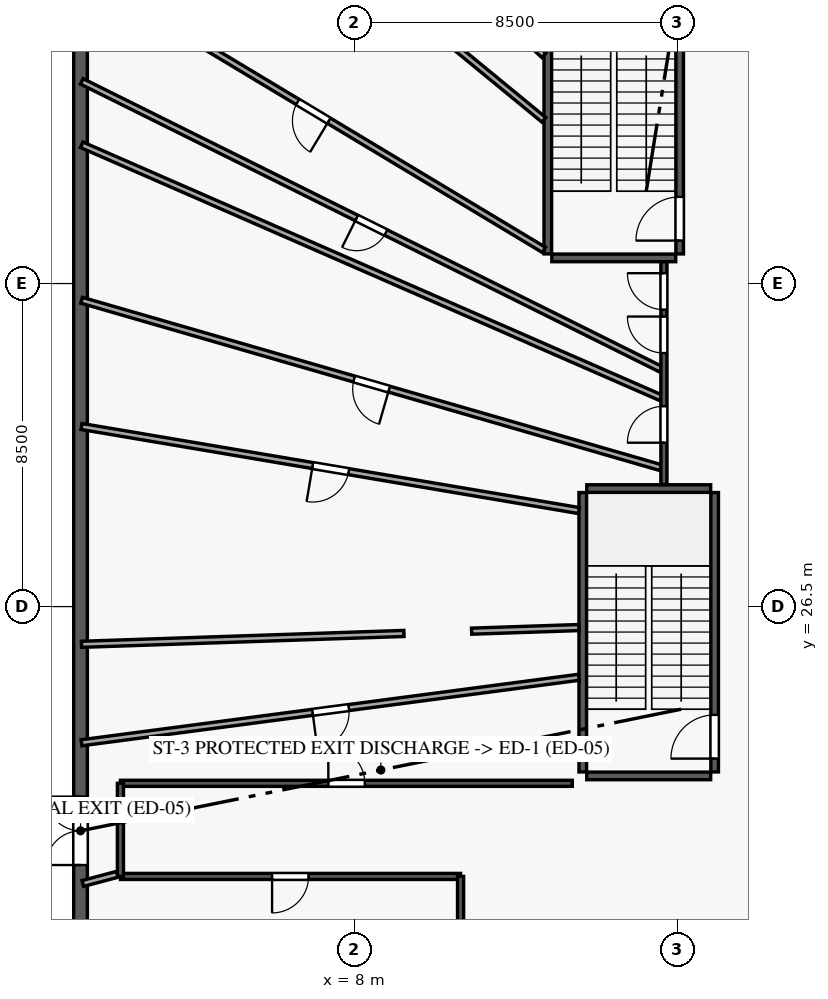
"""IFC4 building model, lengths in metres.
Left out: names, types, materials, properties, quantities, classifications, styles, units other than length and angle.
Written with IfcOpenShell. Run it as: python <this file> out.ifc"""

import sys

from ifc_helpers import new_model, si_unit, direction, frame, frame_2d, origin, origin_with_axes, origin_2d, place, context, subcontext, project, spatial, rectangle, circle, extrude, source, transform, mapped, element, fill, save


model = new_model("IFC4")
c1 = context("Model", 3, precision=1e-05, world=origin(), true_north=direction((0.0, 1.0)))
c2 = subcontext(c1, "Body", "Model", "MODEL_VIEW")
j1 = project(units=[si_unit("LENGTHUNIT", "METRE"), si_unit("PLANEANGLEUNIT", "RADIAN")], contexts=[c1])
p1 = place(None, origin())
s1 = spatial("IfcSite", under=j1, at=p1, CompositionType="ELEMENT")
p2 = place(p1, origin())
s2 = spatial("IfcBuilding", under=s1, at=p2, CompositionType="ELEMENT")
p3 = place(p2, origin())
s3 = spatial("IfcBuildingStorey", under=s2, at=p3, CompositionType="ELEMENT", Elevation=0.0)
m1 = source(origin_with_axes(), c2, "Body", "SweptSolid", [
    extrude(circle(Radius=0.9, at=origin_2d()), origin(), (0.0, 0.0, 1.0), 4.5),
])
p4 = place(p3, frame((10.2, 26.5, 0.0), z_axis=(0.0, 0.0, 1.0), x_axis=(1.0, 0.0, 0.0)))
e1 = element("IfcColumn", 1, at=p4, inside=s3, PredefinedType="COLUMN", context=c2, shape_type="MappedRepresentation", body=[
    mapped(m1, transform((0.0, 0.0, 0.0), scale=1.0)),
])
p5 = place(p3, frame((0.8, 2.5, 0.0), z_axis=(0.0, 0.0, 1.0), x_axis=(0.0, 1.0, 0.0)))
e2 = element("IfcWall", 2, at=p5, inside=s3, PredefinedType="SOLIDWALL", context=c2, shape_type="SweptSolid", body=[
    extrude(rectangle(XDim=48.0, YDim=0.36, at=frame_2d((24.0, 0.0))), origin(), (0.0, 0.0, 1.0), 4.2),
])
p6 = place(p5, frame((42.816, 0.0, 0.85)))
e3 = element("IfcOpeningElement", 3, at=p6, cuts=e2, PredefinedType="OPENING", context=c2, shape_type="SweptSolid", body=[
    extrude(rectangle(XDim=1.8, YDim=2.2, at=frame_2d((0.9, 1.1))), frame((0.0, 0.19, 0.0), z_axis=(0.0, -1.0, 0.0), x_axis=(1.0, 0.0, 0.0)), (0.0, 0.0, 1.0), 0.38),
])
p7 = place(p5, frame((38.338, 0.0, 0.85)))
e4 = element("IfcOpeningElement", 4, at=p7, cuts=e2, PredefinedType="OPENING", context=c2, shape_type="SweptSolid", body=[
    extrude(rectangle(XDim=1.8, YDim=2.2, at=frame_2d((0.9, 1.1))), frame((0.0, 0.19, 0.0), z_axis=(0.0, -1.0, 0.0), x_axis=(1.0, 0.0, 0.0)), (0.0, 0.0, 1.0), 0.38),
])
p8 = place(p5, frame((33.194, 0.0, 0.85)))
e5 = element("IfcOpeningElement", 5, at=p8, cuts=e2, PredefinedType="OPENING", context=c2, shape_type="SweptSolid", body=[
    extrude(rectangle(XDim=1.8, YDim=2.2, at=frame_2d((0.9, 1.1))), frame((0.0, 0.19, 0.0), z_axis=(0.0, -1.0, 0.0), x_axis=(1.0, 0.0, 0.0)), (0.0, 0.0, 1.0), 0.38),
])
p9 = place(p5, frame((29.492, 0.0, 0.85)))
e6 = element("IfcOpeningElement", 6, at=p9, cuts=e2, PredefinedType="OPENING", context=c2, shape_type="SweptSolid", body=[
    extrude(rectangle(XDim=1.8, YDim=2.2, at=frame_2d((0.9, 1.1))), frame((0.0, 0.19, 0.0), z_axis=(0.0, -1.0, 0.0), x_axis=(1.0, 0.0, 0.0)), (0.0, 0.0, 1.0), 0.38),
])
p10 = place(p5, frame((24.971, 0.0, 0.85)))
e7 = element("IfcOpeningElement", 7, at=p10, cuts=e2, PredefinedType="OPENING", context=c2, shape_type="SweptSolid", body=[
    extrude(rectangle(XDim=1.8, YDim=2.2, at=frame_2d((0.9, 1.1))), frame((0.0, 0.19, 0.0), z_axis=(0.0, -1.0, 0.0), x_axis=(1.0, 0.0, 0.0)), (0.0, 0.0, 1.0), 0.38),
])
p11 = place(p5, frame((12.315, 0.0, 0.85)))
e8 = element("IfcOpeningElement", 8, at=p11, cuts=e2, PredefinedType="OPENING", context=c2, shape_type="SweptSolid", body=[
    extrude(rectangle(XDim=1.8, YDim=2.2, at=frame_2d((0.9, 1.1))), frame((0.0, 0.19, 0.0), z_axis=(0.0, -1.0, 0.0), x_axis=(1.0, 0.0, 0.0)), (0.0, 0.0, 1.0), 0.38),
])
p12 = place(p5, frame((6.841, 0.0, 0.85)))
e9 = element("IfcOpeningElement", 9, at=p12, cuts=e2, PredefinedType="OPENING", context=c2, shape_type="SweptSolid", body=[
    extrude(rectangle(XDim=1.8, YDim=2.2, at=frame_2d((0.9, 1.1))), frame((0.0, 0.19, 0.0), z_axis=(0.0, -1.0, 0.0), x_axis=(1.0, 0.0, 0.0)), (0.0, 0.0, 1.0), 0.38),
])
p13 = place(p5, frame((3.189, 0.0, 0.85)))
e10 = element("IfcOpeningElement", 10, at=p13, cuts=e2, PredefinedType="OPENING", context=c2, shape_type="SweptSolid", body=[
    extrude(rectangle(XDim=1.8, YDim=2.2, at=frame_2d((0.9, 1.1))), frame((0.0, 0.19, 0.0), z_axis=(0.0, -1.0, 0.0), x_axis=(1.0, 0.0, 0.0)), (0.0, 0.0, 1.0), 0.38),
])
p14 = place(p5, frame((17.2, 0.0, 0.0)))
e11 = element("IfcOpeningElement", 11, at=p14, cuts=e2, PredefinedType="OPENING", context=c2, shape_type="SweptSolid", body=[
    extrude(rectangle(XDim=1.8, YDim=2.3, at=frame_2d((0.9, 1.15))), frame((0.0, 0.19, 0.0), z_axis=(0.0, -1.0, 0.0), x_axis=(1.0, 0.0, 0.0)), (0.0, 0.0, 1.0), 0.38),
])
p15 = place(p3, frame((14.015, 22.15, 0.0), z_axis=(0.0, 0.0, 1.0), x_axis=(0.0, 1.0, 0.0)))
e12 = element("IfcWall", 12, at=p15, inside=s3, PredefinedType="SHEAR", context=c2, shape_type="SweptSolid", body=[
    extrude(rectangle(XDim=7.35, YDim=0.2, at=frame_2d((3.675, 0.0))), origin(), (0.0, 0.0, 1.0), 4.2),
])
p16 = place(p3, frame((17.485, 22.15, 0.0), z_axis=(0.0, 0.0, 1.0), x_axis=(0.0, 1.0, 0.0)))
e13 = element("IfcWall", 13, at=p16, inside=s3, PredefinedType="SHEAR", context=c2, shape_type="SweptSolid", body=[
    extrude(rectangle(XDim=7.35, YDim=0.2, at=frame_2d((3.675, 0.0))), origin(), (0.0, 0.0, 1.0), 4.2),
])
p17 = place(p16, frame((0.35, 0.0, 0.0)))
e14 = element("IfcOpeningElement", 14, at=p17, cuts=e13, PredefinedType="OPENING", context=c2, shape_type="SweptSolid", body=[
    extrude(rectangle(XDim=1.15, YDim=2.15, at=frame_2d((0.575, 1.075))), frame((0.0, 0.11, 0.0), z_axis=(0.0, -1.0, 0.0), x_axis=(1.0, 0.0, 0.0)), (0.0, 0.0, 1.0), 0.22),
])
p18 = place(p3, frame((13.095, 35.78, 0.0), z_axis=(0.0, 0.0, 1.0), x_axis=(0.0, 1.0, 0.0)))
e15 = element("IfcWall", 15, at=p18, inside=s3, PredefinedType="SHEAR", context=c2, shape_type="SweptSolid", body=[
    extrude(rectangle(XDim=7.35, YDim=0.2, at=frame_2d((3.675, 0.0))), origin(), (0.0, 0.0, 1.0), 4.2),
])
p19 = place(p3, frame((16.565, 35.78, 0.0), z_axis=(0.0, 0.0, 1.0), x_axis=(0.0, 1.0, 0.0)))
e16 = element("IfcWall", 16, at=p19, inside=s3, PredefinedType="SHEAR", context=c2, shape_type="SweptSolid", body=[
    extrude(rectangle(XDim=7.35, YDim=0.2, at=frame_2d((3.675, 0.0))), origin(), (0.0, 0.0, 1.0), 4.2),
])
p20 = place(p19, frame((0.35, 0.0, 0.0)))
e17 = element("IfcOpeningElement", 17, at=p20, cuts=e16, PredefinedType="OPENING", context=c2, shape_type="SweptSolid", body=[
    extrude(rectangle(XDim=1.15, YDim=2.15, at=frame_2d((0.575, 1.075))), frame((0.0, 0.11, 0.0), z_axis=(0.0, -1.0, 0.0), x_axis=(1.0, 0.0, 0.0)), (0.0, 0.0, 1.0), 0.22),
])
p21 = place(p3, frame((13.2, 35.675, 0.0), z_axis=(0.0, 0.0, 1.0), x_axis=(1.0, 0.0, 0.0)))
e18 = element("IfcWall", 18, at=p21, inside=s3, PredefinedType="SHEAR", context=c2, shape_type="SweptSolid", body=[
    extrude(rectangle(XDim=3.26, YDim=0.2, at=frame_2d((1.63, 0.0))), origin(), (0.0, 0.0, 1.0), 4.2),
])
for number, where, z_axis, x_axis in (
    (19, (14.12, 22.045, 0.0), (0.0, 0.0, 1.0), (1.0, 0.0, 0.0)),
    (20, (14.12, 29.605, 0.0), (0.0, 0.0, 1.0), (1.0, 0.0, 0.0)),
):
    element("IfcWall", number, at=place(p3, frame(where, z_axis=z_axis, x_axis=x_axis)), inside=s3, PredefinedType="SHEAR", context=c2, shape_type="SweptSolid", body=[
        extrude(rectangle(XDim=3.26, YDim=0.2, at=frame_2d((1.63, 0.0))), origin(), (0.0, 0.0, 1.0), 4.2),
    ])
p22 = place(p3, frame((16.068, 32.747, 0.0), z_axis=(0.0, 0.0, 1.0), x_axis=(-0.895480769827, 0.44510020318, 0.0)))
e21 = element("IfcWall", 21, at=p22, inside=s3, PredefinedType="PARTITIONING", context=c2, shape_type="SweptSolid", body=[
    extrude(rectangle(XDim=17.015, YDim=0.16, at=frame_2d((8.507, 0.0))), origin(), (0.0, 0.0, 1.0), 4.2),
])
p23 = place(p22, frame((8.077, 0.0, 0.0)))
e22 = element("IfcOpeningElement", 22, at=p23, cuts=e21, PredefinedType="OPENING", context=c2, shape_type="SweptSolid", body=[
    extrude(rectangle(XDim=0.86, YDim=2.04, at=frame_2d((0.43, 1.02))), frame((0.0, 0.09, 0.0), z_axis=(0.0, -1.0, 0.0), x_axis=(1.0, 0.0, 0.0)), (0.0, 0.0, 1.0), 0.18),
])
p24 = place(p3, frame((16.068, 31.996, 0.0), z_axis=(0.0, 0.0, 1.0), x_axis=(-0.916400464202, 0.400262650281, 0.0)))
e23 = element("IfcWall", 23, at=p24, inside=s3, PredefinedType="PARTITIONING", context=c2, shape_type="SweptSolid", body=[
    extrude(rectangle(XDim=16.628, YDim=0.16, at=frame_2d((8.314, 0.0))), origin(), (0.0, 0.0, 1.0), 4.2),
])
p25 = place(p3, frame((16.068, 30.156, 0.0), z_axis=(0.0, 0.0, 1.0), x_axis=(-0.960680893107, 0.277654860608, 0.0)))
e24 = element("IfcWall", 24, at=p25, inside=s3, PredefinedType="PARTITIONING", context=c2, shape_type="SweptSolid", body=[
    extrude(rectangle(XDim=15.864, YDim=0.16, at=frame_2d((7.932, 0.0))), origin(), (0.0, 0.0, 1.0), 4.2),
])
p26 = place(p25, frame((7.44, 0.0, 0.0)))
e25 = element("IfcOpeningElement", 25, at=p26, cuts=e24, PredefinedType="OPENING", context=c2, shape_type="SweptSolid", body=[
    extrude(rectangle(XDim=0.96, YDim=2.15, at=frame_2d((0.48, 1.075))), frame((0.0, 0.09, 0.0), z_axis=(0.0, -1.0, 0.0), x_axis=(1.0, 0.0, 0.0)), (0.0, 0.0, 1.0), 0.18),
])
p27 = place(p3, frame((12.993, 39.307, 0.0), z_axis=(0.0, 0.0, 1.0), x_axis=(-0.772944890545, 0.634473164272, 0.0)))
e26 = element("IfcWall", 26, at=p27, inside=s3, PredefinedType="PARTITIONING", context=c2, shape_type="SweptSolid", body=[
    extrude(rectangle(XDim=15.723, YDim=0.16, at=frame_2d((7.862, 0.0))), origin(), (0.0, 0.0, 1.0), 4.2),
])
p28 = place(p3, frame((12.993, 41.004, 0.0), z_axis=(0.0, 0.0, 1.0), x_axis=(-0.732268799171, 0.681015716236, 0.0)))
e27 = element("IfcWall", 27, at=p28, inside=s3, PredefinedType="PARTITIONING", context=c2, shape_type="SweptSolid", body=[
    extrude(rectangle(XDim=14.905, YDim=0.16, at=frame_2d((7.452, 0.0))), origin(), (0.0, 0.0, 1.0), 4.2),
])
p29 = place(p28, frame((6.96, 0.0, 0.0)))
e28 = element("IfcOpeningElement", 28, at=p29, cuts=e27, PredefinedType="OPENING", context=c2, shape_type="SweptSolid", body=[
    extrude(rectangle(XDim=0.96, YDim=2.15, at=frame_2d((0.48, 1.075))), frame((0.0, 0.09, 0.0), z_axis=(0.0, -1.0, 0.0), x_axis=(1.0, 0.0, 0.0)), (0.0, 0.0, 1.0), 0.18),
])
p30 = place(p3, frame((12.993, 35.885, 0.0), z_axis=(0.0, 0.0, 1.0), x_axis=(-0.857213350392, 0.514961427594, 0.0)))
e29 = element("IfcWall", 29, at=p30, inside=s3, PredefinedType="PARTITIONING", context=c2, shape_type="SweptSolid", body=[
    extrude(rectangle(XDim=14.184, YDim=0.16, at=frame_2d((7.092, 0.0))), origin(), (0.0, 0.0, 1.0), 4.2),
])
p31 = place(p30, frame((6.6, 0.0, 0.0)))
e30 = element("IfcOpeningElement", 30, at=p31, cuts=e29, PredefinedType="OPENING", context=c2, shape_type="SweptSolid", body=[
    extrude(rectangle(XDim=0.96, YDim=2.15, at=frame_2d((0.48, 1.075))), frame((0.0, 0.09, 0.0), z_axis=(0.0, -1.0, 0.0), x_axis=(1.0, 0.0, 0.0)), (0.0, 0.0, 1.0), 0.18),
])
p32 = place(p3, frame((13.913, 29.027, 0.0), z_axis=(0.0, 0.0, 1.0), x_axis=(-0.986009968188, 0.166686360073, 0.0)))
e31 = element("IfcWall", 31, at=p32, inside=s3, PredefinedType="PARTITIONING", context=c2, shape_type="SweptSolid", body=[
    extrude(rectangle(XDim=13.273, YDim=0.16, at=frame_2d((6.636, 0.0))), origin(), (0.0, 0.0, 1.0), 4.2),
])
p33 = place(p32, frame((6.144, 0.0, 0.0)))
e32 = element("IfcOpeningElement", 32, at=p33, cuts=e31, PredefinedType="OPENING", context=c2, shape_type="SweptSolid", body=[
    extrude(rectangle(XDim=0.96, YDim=2.15, at=frame_2d((0.48, 1.075))), frame((0.0, 0.09, 0.0), z_axis=(0.0, -1.0, 0.0), x_axis=(1.0, 0.0, 0.0)), (0.0, 0.0, 1.0), 0.18),
])
p34 = place(p3, frame((13.913, 24.64, 0.0), z_axis=(0.0, 0.0, 1.0), x_axis=(-0.991443338572, -0.130537758528, 0.0)))
e33 = element("IfcWall", 33, at=p34, inside=s3, PredefinedType="PARTITIONING", context=c2, shape_type="SweptSolid", body=[
    extrude(rectangle(XDim=13.2, YDim=0.16, at=frame_2d((6.6, 0.0))), origin(), (0.0, 0.0, 1.0), 4.2),
])
p35 = place(p34, frame((6.108, 0.0, 0.0)))
e34 = element("IfcOpeningElement", 34, at=p35, cuts=e33, PredefinedType="OPENING", context=c2, shape_type="SweptSolid", body=[
    extrude(rectangle(XDim=0.96, YDim=2.15, at=frame_2d((0.48, 1.075))), frame((0.0, 0.09, 0.0), z_axis=(0.0, -1.0, 0.0), x_axis=(1.0, 0.0, 0.0)), (0.0, 0.0, 1.0), 0.18),
])
p36 = place(p3, frame((1.85, 21.85, 0.0), z_axis=(0.0, 0.0, 1.0), x_axis=(1.0, 0.0, 0.0)))
e35 = element("IfcWall", 35, at=p36, inside=s3, PredefinedType="PARTITIONING", context=c2, shape_type="SweptSolid", body=[
    extrude(rectangle(XDim=11.89, YDim=0.16, at=frame_2d((5.945, 0.0))), origin(), (0.0, 0.0, 1.0), 4.2),
])
p37 = place(p36, frame((5.47, 0.0, 0.0)))
e36 = element("IfcOpeningElement", 36, at=p37, cuts=e35, PredefinedType="OPENING", context=c2, shape_type="SweptSolid", body=[
    extrude(rectangle(XDim=0.96, YDim=2.15, at=frame_2d((0.48, 1.075))), frame((0.0, 0.09, 0.0), z_axis=(0.0, -1.0, 0.0), x_axis=(1.0, 0.0, 0.0)), (0.0, 0.0, 1.0), 0.18),
])
p38 = place(p3, frame((10.8, 19.4, 0.0), z_axis=(0.0, 0.0, 1.0), x_axis=(-1.0, 0.0, 0.0)))
e37 = element("IfcWall", 37, at=p38, inside=s3, PredefinedType="PARTITIONING", context=c2, shape_type="SweptSolid", body=[
    extrude(rectangle(XDim=8.95, YDim=0.16, at=frame_2d((4.475, 0.0))), origin(), (0.0, 0.0, 1.0), 4.2),
])
p39 = place(p38, frame((4.0, 0.0, 0.0)))
e38 = element("IfcOpeningElement", 38, at=p39, cuts=e37, PredefinedType="OPENING", context=c2, shape_type="SweptSolid", body=[
    extrude(rectangle(XDim=0.96, YDim=2.15, at=frame_2d((0.48, 1.075))), frame((0.0, 0.09, 0.0), z_axis=(0.0, -1.0, 0.0), x_axis=(1.0, 0.0, 0.0)), (0.0, 0.0, 1.0), 0.18),
])
p40 = place(p3, frame((0.825, 25.508, 0.0), z_axis=(0.0, 0.0, 1.0), x_axis=(0.999432873897, 0.033673885638, 0.0)))
e39 = element("IfcWall", 39, at=p40, inside=s3, PredefinedType="PARTITIONING", context=c2, shape_type="SweptSolid", body=[
    extrude(rectangle(XDim=8.49, YDim=0.16, at=frame_2d((4.245, 0.0))), origin(), (0.0, 0.0, 1.0), 4.2),
])
p41 = place(p3, frame((16.15, 29.712, 0.0), z_axis=(0.0, 0.0, 1.0), x_axis=(0.0, 1.0, 0.0)))
e40 = element("IfcWall", 40, at=p41, inside=s3, PredefinedType="PARTITIONING", context=c2, shape_type="SweptSolid", body=[
    extrude(rectangle(XDim=5.861, YDim=0.16, at=frame_2d((2.93, 0.0))), origin(), (0.0, 0.0, 1.0), 4.2),
])
p42 = place(p41, frame((3.459, 0.0, 0.0)))
e41 = element("IfcOpeningElement", 41, at=p42, cuts=e40, PredefinedType="OPENING", context=c2, shape_type="SweptSolid", body=[
    extrude(rectangle(XDim=0.96, YDim=2.15, at=frame_2d((0.48, 1.075))), frame((0.0, 0.09, 0.0), z_axis=(0.0, -1.0, 0.0), x_axis=(1.0, 0.0, 0.0)), (0.0, 0.0, 1.0), 0.18),
])
p43 = place(p41, frame((1.1, 0.0, 0.0)))
e42 = element("IfcOpeningElement", 42, at=p43, cuts=e40, PredefinedType="OPENING", context=c2, shape_type="SweptSolid", body=[
    extrude(rectangle(XDim=0.96, YDim=2.15, at=frame_2d((0.48, 1.075))), frame((0.0, 0.09, 0.0), z_axis=(0.0, -1.0, 0.0), x_axis=(1.0, 0.0, 0.0)), (0.0, 0.0, 1.0), 0.18),
])
p44 = place(p41, frame((4.601, 0.0, 0.0)))
e43 = element("IfcOpeningElement", 43, at=p44, cuts=e40, PredefinedType="OPENING", context=c2, shape_type="SweptSolid", body=[
    extrude(rectangle(XDim=0.96, YDim=2.15, at=frame_2d((0.48, 1.075))), frame((0.0, 0.09, 0.0), z_axis=(0.0, -1.0, 0.0), x_axis=(1.0, 0.0, 0.0)), (0.0, 0.0, 1.0), 0.18),
])
p45 = place(p3, frame((11.09, 25.854, 0.0), z_axis=(0.0, 0.0, 1.0), x_axis=(0.999434594921, 0.033622767225, 0.0)))
e44 = element("IfcWall", 44, at=p45, inside=s3, PredefinedType="PARTITIONING", context=c2, shape_type="SweptSolid", body=[
    extrude(rectangle(XDim=2.825, YDim=0.16, at=frame_2d((1.412, 0.0))), origin(), (0.0, 0.0, 1.0), 3.25),
])
p46 = place(p3, frame((1.85, 19.4, 0.0), z_axis=(0.0, 0.0, 1.0), x_axis=(0.0, 1.0, 0.0)))
e45 = element("IfcWall", 45, at=p46, inside=s3, PredefinedType="PARTITIONING", context=c2, shape_type="SweptSolid", body=[
    extrude(rectangle(XDim=2.45, YDim=0.16, at=frame_2d((1.225, 0.0))), origin(), (0.0, 0.0, 1.0), 4.2),
])
p47 = place(p3, frame((10.8, 17.35, 0.0), z_axis=(0.0, 0.0, 1.0), x_axis=(0.0, 1.0, 0.0)))
e46 = element("IfcWall", 46, at=p47, inside=s3, PredefinedType="PARTITIONING", context=c2, shape_type="SweptSolid", body=[
    extrude(rectangle(XDim=2.05, YDim=0.16, at=frame_2d((1.025, 0.0))), origin(), (0.0, 0.0, 1.0), 3.25),
])
p48 = place(p3, frame((1.768, 19.456, 0.0), z_axis=(0.0, 0.0, 1.0), x_axis=(-0.966407427341, -0.257014949721, 0.0)))
e47 = element("IfcWall", 47, at=p48, inside=s3, PredefinedType="PARTITIONING", context=c2, shape_type="SweptSolid", body=[
    extrude(rectangle(XDim=0.938, YDim=0.16, at=frame_2d((0.469, 0.0))), origin(), (0.0, 0.0, 1.0), 4.2),
])
m2 = source(origin_with_axes(), c2, "Body", "SweptSolid", [
    extrude(rectangle(XDim=1.8, YDim=2.2, at=frame_2d((0.9, 1.1))), frame((0.0, 0.03, 0.0), z_axis=(0.0, -1.0, 0.0), x_axis=(1.0, 0.0, 0.0)), (0.0, 0.0, 1.0), 0.06),
])
p49 = place(p7, origin())
e48 = element("IfcWindow", 48, at=p49, inside=s3, PartitioningType="SINGLE_PANEL", PredefinedType="WINDOW", context=c2, shape_type="MappedRepresentation", body=[
    mapped(m2, transform((0.0, 0.0, 0.0), scale=1.0)),
])
fill(e4, e48)
p50 = place(p8, origin())
e49 = element("IfcWindow", 49, at=p50, inside=s3, PartitioningType="SINGLE_PANEL", PredefinedType="WINDOW", context=c2, shape_type="MappedRepresentation", body=[
    mapped(m2, transform((0.0, 0.0, 0.0), scale=1.0)),
])
fill(e5, e49)
p51 = place(p9, origin())
e50 = element("IfcWindow", 50, at=p51, inside=s3, PartitioningType="SINGLE_PANEL", PredefinedType="WINDOW", context=c2, shape_type="MappedRepresentation", body=[
    mapped(m2, transform((0.0, 0.0, 0.0), scale=1.0)),
])
fill(e6, e50)
p52 = place(p10, origin())
e51 = element("IfcWindow", 51, at=p52, inside=s3, PartitioningType="SINGLE_PANEL", PredefinedType="WINDOW", context=c2, shape_type="MappedRepresentation", body=[
    mapped(m2, transform((0.0, 0.0, 0.0), scale=1.0)),
])
fill(e7, e51)
m3 = source(origin_with_axes(), c2, "Body", "SweptSolid", [
    extrude(rectangle(XDim=1.8, YDim=2.3, at=frame_2d((0.9, 1.15))), frame((0.0, 0.025, 0.0), z_axis=(0.0, -1.0, 0.0), x_axis=(1.0, 0.0, 0.0)), (0.0, 0.0, 1.0), 0.05),
])
p53 = place(p14, origin())
e52 = element("IfcDoor", 52, at=p53, inside=s3, OperationType="DOUBLE_DOOR_SINGLE_SWING", PredefinedType="DOOR", context=c2, shape_type="MappedRepresentation", body=[
    mapped(m3, transform((0.0, 0.0, 0.0), scale=1.0)),
])
fill(e11, e52)
m4 = source(origin_with_axes(), c2, "Body", "SweptSolid", [
    extrude(rectangle(XDim=1.15, YDim=2.15, at=frame_2d((0.575, 1.075))), frame((0.0, 0.025, 0.0), z_axis=(0.0, -1.0, 0.0), x_axis=(1.0, 0.0, 0.0)), (0.0, 0.0, 1.0), 0.05),
])
p54 = place(p17, origin())
e53 = element("IfcDoor", 53, at=p54, inside=s3, OperationType="SINGLE_SWING_LEFT", PredefinedType="DOOR", context=c2, shape_type="MappedRepresentation", body=[
    mapped(m4, transform((0.0, 0.0, 0.0), scale=1.0)),
])
fill(e14, e53)
p55 = place(p20, origin())
e54 = element("IfcDoor", 54, at=p55, inside=s3, OperationType="SINGLE_SWING_LEFT", PredefinedType="DOOR", context=c2, shape_type="MappedRepresentation", body=[
    mapped(m4, transform((0.0, 0.0, 0.0), scale=1.0)),
])
fill(e17, e54)
m5 = source(origin_with_axes(), c2, "Body", "SweptSolid", [
    extrude(rectangle(XDim=0.96, YDim=2.15, at=frame_2d((0.48, 1.075))), frame((0.0, 0.025, 0.0), z_axis=(0.0, -1.0, 0.0), x_axis=(1.0, 0.0, 0.0)), (0.0, 0.0, 1.0), 0.05),
])
p56 = place(p35, origin())
e55 = element("IfcDoor", 55, at=p56, inside=s3, OperationType="SINGLE_SWING_RIGHT", PredefinedType="DOOR", context=c2, shape_type="MappedRepresentation", body=[
    mapped(m5, transform((0.0, 0.0, 0.0), scale=1.0)),
])
fill(e34, e55)
p57 = place(p37, origin())
e56 = element("IfcDoor", 56, at=p57, inside=s3, OperationType="SINGLE_SWING_LEFT", PredefinedType="DOOR", context=c2, shape_type="MappedRepresentation", body=[
    mapped(m5, transform((0.0, 0.0, 0.0), scale=1.0)),
])
fill(e36, e56)
p58 = place(p39, origin())
e57 = element("IfcDoor", 57, at=p58, inside=s3, OperationType="SINGLE_SWING_RIGHT", PredefinedType="DOOR", context=c2, shape_type="MappedRepresentation", body=[
    mapped(m5, transform((0.0, 0.0, 0.0), scale=1.0)),
])
fill(e38, e57)
p59 = place(p31, origin())
e58 = element("IfcDoor", 58, at=p59, inside=s3, OperationType="SINGLE_SWING_LEFT", PredefinedType="DOOR", context=c2, shape_type="MappedRepresentation", body=[
    mapped(m5, transform((0.0, 0.0, 0.0), scale=1.0)),
])
fill(e30, e58)
p60 = place(p42, origin())
e59 = element("IfcDoor", 59, at=p60, inside=s3, OperationType="SINGLE_SWING_RIGHT", PredefinedType="DOOR", context=c2, shape_type="MappedRepresentation", body=[
    mapped(m5, transform((0.0, 0.0, 0.0), scale=1.0)),
])
fill(e41, e59)
p61 = place(p43, origin())
e60 = element("IfcDoor", 60, at=p61, inside=s3, OperationType="SINGLE_SWING_LEFT", PredefinedType="DOOR", context=c2, shape_type="MappedRepresentation", body=[
    mapped(m5, transform((0.0, 0.0, 0.0), scale=1.0)),
])
fill(e42, e60)
p62 = place(p44, origin())
e61 = element("IfcDoor", 61, at=p62, inside=s3, OperationType="SINGLE_SWING_RIGHT", PredefinedType="DOOR", context=c2, shape_type="MappedRepresentation", body=[
    mapped(m5, transform((0.0, 0.0, 0.0), scale=1.0)),
])
fill(e43, e61)
p63 = place(p26, origin())
e62 = element("IfcDoor", 62, at=p63, inside=s3, OperationType="SINGLE_SWING_LEFT", PredefinedType="DOOR", context=c2, shape_type="MappedRepresentation", body=[
    mapped(m5, transform((0.0, 0.0, 0.0), scale=1.0)),
])
fill(e25, e62)
p64 = place(p33, origin())
e63 = element("IfcDoor", 63, at=p64, inside=s3, OperationType="SINGLE_SWING_RIGHT", PredefinedType="DOOR", context=c2, shape_type="MappedRepresentation", body=[
    mapped(m5, transform((0.0, 0.0, 0.0), scale=1.0)),
])
fill(e32, e63)
m6 = source(origin_with_axes(), c2, "Body", "SweptSolid", [
    extrude(rectangle(XDim=0.86, YDim=2.04, at=frame_2d((0.43, 1.02))), frame((0.0, 0.025, 0.0), z_axis=(0.0, -1.0, 0.0), x_axis=(1.0, 0.0, 0.0)), (0.0, 0.0, 1.0), 0.05),
])
p65 = place(p23, origin())
e64 = element("IfcDoor", 64, at=p65, inside=s3, OperationType="SINGLE_SWING_RIGHT", PredefinedType="DOOR", context=c2, shape_type="MappedRepresentation", body=[
    mapped(m6, transform((0.0, 0.0, 0.0), scale=1.0)),
])
fill(e22, e64)
save(model, sys.argv[1])
